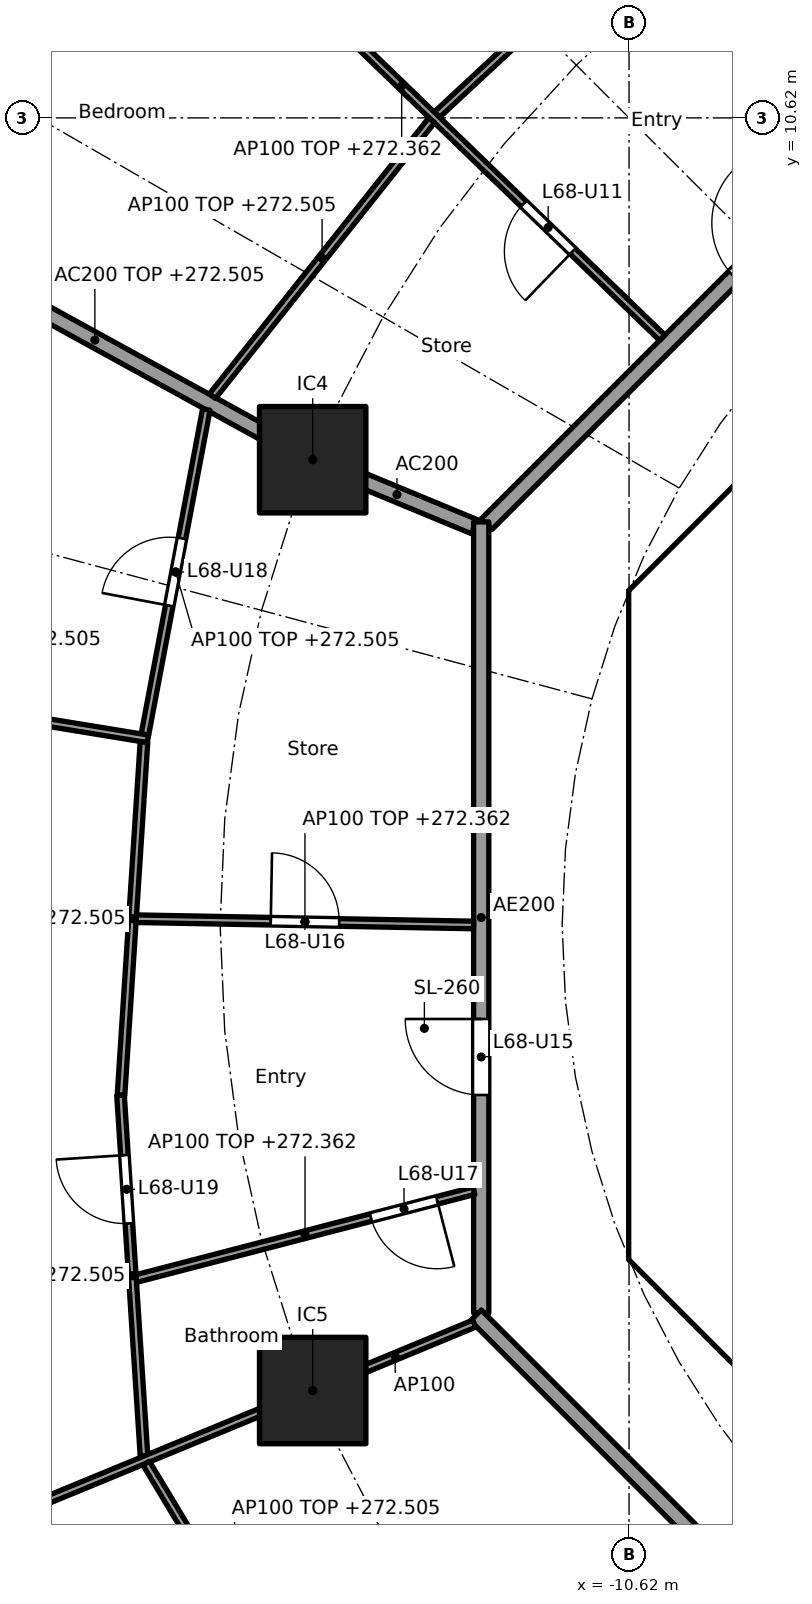
"""IFC4 building model, lengths in metres.
Left out: names, types, materials, properties, quantities, classifications, styles, units other than length and angle.
Written with IfcOpenShell. Run it as: python <this file> out.ifc"""

import sys

from ifc_helpers import new_model, si_unit, direction, frame, frame_2d, origin, origin_2d, place, context, subcontext, project, spatial, polyline, rectangle, outline, extrude, element, fill, save


model = new_model("IFC4")
c1 = context("Model", 3, precision=1e-05, world=origin(), true_north=direction((0.0, 1.0)))
c2 = subcontext(c1, "Body", "Model", "MODEL_VIEW")
j1 = project(units=[si_unit("LENGTHUNIT", "METRE"), si_unit("PLANEANGLEUNIT", "RADIAN")], contexts=[c1])
p1 = place(None, origin())
s1 = spatial("IfcSite", under=j1, at=p1, CompositionType="ELEMENT")
p2 = place(p1, origin())
s2 = spatial("IfcBuilding", under=s1, at=p2, CompositionType="ELEMENT")
p3 = place(p2, frame((0.0, 0.0, 269.6)))
s3 = spatial("IfcBuildingStorey", under=s2, at=p3, CompositionType="ELEMENT", Elevation=269.6)
for number, where, z_axis, x_axis in (
    (1, (-14.782, 6.123, 0.0), (0.0, 0.0, 1.0), (1.0, 0.0, 0.0)),
    (2, (-14.782, -6.123, 0.0), (0.0, 0.0, 1.0), (1.0, 0.0, 0.0)),
):
    element("IfcColumn", number, at=place(p3, frame(where, z_axis=z_axis, x_axis=x_axis)), inside=s3, PredefinedType="COLUMN", context=c2, shape_type="SweptSolid", body=[
        extrude(rectangle(XDim=1.4, YDim=1.4, at=origin_2d()), origin(), (0.0, 0.0, 1.0), 3.7),
    ])
p4 = place(p3, frame((-4.613, 9.988, 0.0), z_axis=(0.0, 0.0, 1.0), x_axis=(-0.707106781187, -0.707106781187, 0.0)))
e3 = element("IfcWall", 3, at=p4, inside=s3, PredefinedType="SHEAR", context=c2, shape_type="SweptSolid", body=[
    extrude(rectangle(XDim=7.602, YDim=0.6, at=frame_2d((3.801, 0.0))), origin(), (0.0, 0.0, 1.0), 3.44),
])
p5 = place(p4, frame((0.351, 0.0, 0.0)))
e4 = element("IfcOpeningElement", 4, at=p5, cuts=e3, PredefinedType="OPENING", context=c2, shape_type="SweptSolid", body=[
    extrude(rectangle(XDim=1.1, YDim=2.1, at=frame_2d((0.55, 1.05))), frame((0.0, 0.31, 0.0), z_axis=(0.0, -1.0, 0.0), x_axis=(1.0, 0.0, 0.0)), (0.0, 0.0, 1.0), 0.62),
])
p6 = place(p3, frame((-10.325, 3.801, 0.0), z_axis=(0.0, 0.0, 1.0), x_axis=(0.0, -1.0, 0.0)))
e5 = element("IfcWall", 5, at=p6, inside=s3, PredefinedType="SHEAR", context=c2, shape_type="SweptSolid", body=[
    extrude(rectangle(XDim=7.602, YDim=0.6, at=frame_2d((3.801, 0.0))), origin(), (0.0, 0.0, 1.0), 3.44),
])
p7 = place(p6, frame((0.651, 0.0, 0.0)))
e6 = element("IfcOpeningElement", 6, at=p7, cuts=e5, PredefinedType="OPENING", context=c2, shape_type="SweptSolid", body=[
    extrude(rectangle(XDim=1.5, YDim=2.1, at=frame_2d((0.75, 1.05))), frame((0.0, 0.31, 0.0), z_axis=(0.0, -1.0, 0.0), x_axis=(1.0, 0.0, 0.0)), (0.0, 0.0, 1.0), 0.62),
])
p8 = place(p6, frame((5.451, 0.0, 0.0)))
e7 = element("IfcOpeningElement", 7, at=p8, cuts=e5, PredefinedType="OPENING", context=c2, shape_type="SweptSolid", body=[
    extrude(rectangle(XDim=1.5, YDim=2.1, at=frame_2d((0.75, 1.05))), frame((0.0, 0.31, 0.0), z_axis=(0.0, -1.0, 0.0), x_axis=(1.0, 0.0, 0.0)), (0.0, 0.0, 1.0), 0.62),
])
p9 = place(p3, frame((-9.988, -4.613, 0.0), z_axis=(0.0, 0.0, 1.0), x_axis=(0.707106781187, -0.707106781187, 0.0)))
e8 = element("IfcWall", 8, at=p9, inside=s3, PredefinedType="SHEAR", context=c2, shape_type="SweptSolid", body=[
    extrude(rectangle(XDim=7.602, YDim=0.6, at=frame_2d((3.801, 0.0))), origin(), (0.0, 0.0, 1.0), 3.44),
])
p10 = place(p9, frame((6.151, 0.0, 0.0)))
e9 = element("IfcOpeningElement", 9, at=p10, cuts=e8, PredefinedType="OPENING", context=c2, shape_type="SweptSolid", body=[
    extrude(rectangle(XDim=1.1, YDim=2.1, at=frame_2d((0.55, 1.05))), frame((0.0, 0.31, 0.0), z_axis=(0.0, -1.0, 0.0), x_axis=(1.0, 0.0, 0.0)), (0.0, 0.0, 1.0), 0.62),
])
p11 = place(p3, origin())
e10 = element("IfcWall", 10, at=p11, inside=s3, PredefinedType="SHEAR", context=c2, shape_type="SweptSolid", body=[
    extrude(outline(polyline([(-10.625, -3.801), (-10.025, -3.801), (-10.025, -4.152), (-9.776, -4.401), (-10.2, -4.825), (-10.625, -4.401), (-10.625, -3.801)])), origin(), (0.0, 0.0, 1.0), 3.44),
])
p12 = place(p3, origin())
e11 = element("IfcWall", 11, at=p12, inside=s3, PredefinedType="SHEAR", context=c2, shape_type="SweptSolid", body=[
    extrude(outline(polyline([(-10.2, 4.825), (-9.776, 4.401), (-10.025, 4.152), (-10.025, 3.801), (-10.625, 3.801), (-10.625, 4.401), (-10.2, 4.825)])), origin(), (0.0, 0.0, 1.0), 3.44),
])
for number, where, z_axis, x_axis in (
    (12, (-10.025, -4.0, 0.0), (0.0, 0.0, 1.0), (1.0, 0.0, 0.0)),
    (13, (-10.025, 4.0, 0.0), (0.0, 0.0, 1.0), (1.0, 0.0, 0.0)),
):
    element("IfcWall", number, at=place(p3, frame(where, z_axis=z_axis, x_axis=x_axis)), inside=s3, PredefinedType="PARTITIONING", context=c2, shape_type="SweptSolid", body=[
        extrude(rectangle(XDim=3.325, YDim=0.2, at=frame_2d((1.662, 0.0))), origin(), (0.0, 0.0, 1.0), 3.44),
    ])
p13 = place(p3, frame((-12.657, 5.243, 0.0), z_axis=(0.0, 0.0, 1.0), x_axis=(-0.923869415315, 0.382707856524, 0.0)))
e14 = element("IfcWall", 14, at=p13, inside=s3, PredefinedType="PARTITIONING", context=c2, shape_type="SweptSolid", body=[
    extrude(rectangle(XDim=2.2, YDim=0.2, at=frame_2d((1.1, 0.0))), origin(), (0.0, 0.0, 1.0), 3.44),
])
p14 = place(p3, frame((-14.826, 6.147, 0.0), z_axis=(0.0, 0.0, 1.0), x_axis=(-0.876484755865, 0.481429613481, 0.0)))
e15 = element("IfcWall", 15, at=p14, inside=s3, PredefinedType="PARTITIONING", context=c2, shape_type="SweptSolid", body=[
    extrude(rectangle(XDim=6.439, YDim=0.2, at=frame_2d((3.219, 0.0))), origin(), (0.0, 0.0, 1.0), 2.905),
])
p15 = place(p3, frame((-5.275, 12.494, 0.0), z_axis=(0.0, 0.0, 1.0), x_axis=(-0.707106781187, -0.707106781187, 0.0)))
e16 = element("IfcWall", 16, at=p15, inside=s3, PredefinedType="PARTITIONING", context=c2, shape_type="SweptSolid", body=[
    extrude(rectangle(XDim=10.209, YDim=0.2, at=frame_2d((5.104, 0.0))), origin(), (0.0, 0.0, 1.0), 3.44),
])
p16 = place(p15, frame((4.604, 0.0, 0.0)))
e17 = element("IfcOpeningElement", 17, at=p16, cuts=e16, PredefinedType="OPENING", context=c2, shape_type="SweptSolid", body=[
    extrude(rectangle(XDim=1.0, YDim=2.1, at=frame_2d((0.5, 1.05))), frame((0.0, 0.11, 0.0), z_axis=(0.0, -1.0, 0.0), x_axis=(1.0, 0.0, 0.0)), (0.0, 0.0, 1.0), 0.22),
])
p17 = place(p3, frame((-12.565, 5.304, 0.0), z_axis=(0.0, 0.0, 1.0), x_axis=(0.0, -1.0, 0.0)))
e18 = element("IfcWall", 18, at=p17, inside=s3, PredefinedType="PARTITIONING", context=c2, shape_type="SweptSolid", body=[
    extrude(rectangle(XDim=10.409, YDim=0.2, at=frame_2d((5.205, 0.0))), origin(), (0.0, 0.0, 1.0), 3.44),
])
p18 = place(p17, frame((6.539, 0.0, 0.0)))
e19 = element("IfcOpeningElement", 19, at=p18, cuts=e18, PredefinedType="OPENING", context=c2, shape_type="SweptSolid", body=[
    extrude(rectangle(XDim=1.0, YDim=2.1, at=frame_2d((0.5, 1.05))), frame((0.0, 0.11, 0.0), z_axis=(0.0, -1.0, 0.0), x_axis=(1.0, 0.0, 0.0)), (0.0, 0.0, 1.0), 0.22),
])
p19 = place(p3, frame((-12.635, -5.134, 0.0), z_axis=(0.0, 0.0, 1.0), x_axis=(0.707106781187, -0.707106781187, 0.0)))
e20 = element("IfcWall", 20, at=p19, inside=s3, PredefinedType="PARTITIONING", context=c2, shape_type="SweptSolid", body=[
    extrude(rectangle(XDim=10.609, YDim=0.2, at=frame_2d((5.305, 0.0))), origin(), (0.0, 0.0, 1.0), 3.44),
])
p20 = place(p3, frame((-7.709, 10.197, 0.0), z_axis=(0.0, 0.0, 1.0), x_axis=(-0.515516160663, 0.856879856278, 0.0)))
e21 = element("IfcWall", 21, at=p20, inside=s3, PredefinedType="PARTITIONING", context=c2, shape_type="SweptSolid", body=[
    extrude(rectangle(XDim=9.426, YDim=0.1, at=frame_2d((4.713, 0.0))), origin(), (0.0, 0.0, 1.0), 2.762),
])
p21 = place(p20, frame((1.615, 0.0, 0.0)))
e22 = element("IfcOpeningElement", 22, at=p21, cuts=e21, PredefinedType="OPENING", context=c2, shape_type="SweptSolid", body=[
    extrude(rectangle(XDim=0.9, YDim=2.1, at=frame_2d((0.45, 1.05))), frame((0.0, 0.06, 0.0), z_axis=(0.0, -1.0, 0.0), x_axis=(1.0, 0.0, 0.0)), (0.0, 0.0, 1.0), 0.12),
])
p22 = place(p20, frame((6.328, 0.0, 0.0)))
e23 = element("IfcOpeningElement", 23, at=p22, cuts=e21, PredefinedType="OPENING", context=c2, shape_type="SweptSolid", body=[
    extrude(rectangle(XDim=0.9, YDim=2.1, at=frame_2d((0.45, 1.05))), frame((0.0, 0.06, 0.0), z_axis=(0.0, -1.0, 0.0), x_axis=(1.0, 0.0, 0.0)), (0.0, 0.0, 1.0), 0.12),
])
p23 = place(p3, frame((-9.875, 13.702, 0.0), z_axis=(0.0, 0.0, 1.0), x_axis=(-0.732618266441, -0.680639754699, 0.0)))
e24 = element("IfcWall", 24, at=p23, inside=s3, PredefinedType="PARTITIONING", context=c2, shape_type="SweptSolid", body=[
    extrude(rectangle(XDim=4.467, YDim=0.1, at=frame_2d((2.233, 0.0))), origin(), (0.0, 0.0, 1.0), 2.905),
])
p24 = place(p23, frame((1.783, 0.0, 0.0)))
e25 = element("IfcOpeningElement", 25, at=p24, cuts=e24, PredefinedType="OPENING", context=c2, shape_type="SweptSolid", body=[
    extrude(rectangle(XDim=0.9, YDim=2.1, at=frame_2d((0.45, 1.05))), frame((0.0, 0.06, 0.0), z_axis=(0.0, -1.0, 0.0), x_axis=(1.0, 0.0, 0.0)), (0.0, 0.0, 1.0), 0.12),
])
p25 = place(p3, frame((-10.183, 7.727, 0.0), z_axis=(0.0, 0.0, 1.0), x_axis=(-0.719063433856, 0.694944442449, 0.0)))
e26 = element("IfcWall", 26, at=p25, inside=s3, PredefinedType="PARTITIONING", context=c2, shape_type="SweptSolid", body=[
    extrude(rectangle(XDim=9.535, YDim=0.1, at=frame_2d((4.768, 0.0))), origin(), (0.0, 0.0, 1.0), 2.762),
])
p26 = place(p25, frame((1.637, 0.0, 0.0)))
e27 = element("IfcOpeningElement", 27, at=p26, cuts=e26, PredefinedType="OPENING", context=c2, shape_type="SweptSolid", body=[
    extrude(rectangle(XDim=0.9, YDim=2.1, at=frame_2d((0.45, 1.05))), frame((0.0, 0.06, 0.0), z_axis=(0.0, -1.0, 0.0), x_axis=(1.0, 0.0, 0.0)), (0.0, 0.0, 1.0), 0.12),
])
p27 = place(p25, frame((6.405, 0.0, 0.0)))
e28 = element("IfcOpeningElement", 28, at=p27, cuts=e26, PredefinedType="OPENING", context=c2, shape_type="SweptSolid", body=[
    extrude(rectangle(XDim=0.9, YDim=2.1, at=frame_2d((0.45, 1.05))), frame((0.0, 0.06, 0.0), z_axis=(0.0, -1.0, 0.0), x_axis=(1.0, 0.0, 0.0)), (0.0, 0.0, 1.0), 0.12),
])
p28 = place(p3, frame((-13.216, 10.589, 0.0), z_axis=(0.0, 0.0, 1.0), x_axis=(-0.622251572882, -0.782817335045, 0.0)))
e29 = element("IfcWall", 29, at=p28, inside=s3, PredefinedType="PARTITIONING", context=c2, shape_type="SweptSolid", body=[
    extrude(rectangle(XDim=4.636, YDim=0.1, at=frame_2d((2.318, 0.0))), origin(), (0.0, 0.0, 1.0), 2.905),
])
p29 = place(p3, frame((-16.181, 6.783, 0.0), z_axis=(0.0, 0.0, 1.0), x_axis=(-0.185670583745, -0.982612046706, 0.0)))
e30 = element("IfcWall", 30, at=p29, inside=s3, PredefinedType="PARTITIONING", context=c2, shape_type="SweptSolid", body=[
    extrude(rectangle(XDim=4.351, YDim=0.1, at=frame_2d((2.176, 0.0))), origin(), (0.0, 0.0, 1.0), 2.905),
])
p30 = place(p29, frame((1.726, 0.0, 0.0)))
e31 = element("IfcOpeningElement", 31, at=p30, cuts=e30, PredefinedType="OPENING", context=c2, shape_type="SweptSolid", body=[
    extrude(rectangle(XDim=0.9, YDim=2.1, at=frame_2d((0.45, 1.05))), frame((0.0, 0.06, 0.0), z_axis=(0.0, -1.0, 0.0), x_axis=(1.0, 0.0, 0.0)), (0.0, 0.0, 1.0), 0.12),
])
p31 = place(p3, frame((-16.949, 2.451, 0.0), z_axis=(0.0, 0.0, 1.0), x_axis=(-0.986937570833, 0.161103169673, 0.0)))
e32 = element("IfcWall", 32, at=p31, inside=s3, PredefinedType="PARTITIONING", context=c2, shape_type="SweptSolid", body=[
    extrude(rectangle(XDim=5.743, YDim=0.1, at=frame_2d((2.872, 0.0))), origin(), (0.0, 0.0, 1.0), 2.905),
])
p32 = place(p3, frame((-17.002, 2.409, 0.0), z_axis=(0.0, 0.0, 1.0), x_axis=(-0.064855550758, -0.997894662545, 0.0)))
e33 = element("IfcWall", 33, at=p32, inside=s3, PredefinedType="PARTITIONING", context=c2, shape_type="SweptSolid", body=[
    extrude(rectangle(XDim=4.656, YDim=0.1, at=frame_2d((2.328, 0.0))), origin(), (0.0, 0.0, 1.0), 2.905),
])
p33 = place(p3, frame((-12.665, 0.002, 0.0), z_axis=(0.0, 0.0, 1.0), x_axis=(-0.999827178165, 0.018590691287, 0.0)))
e34 = element("IfcWall", 34, at=p33, inside=s3, PredefinedType="PARTITIONING", context=c2, shape_type="SweptSolid", body=[
    extrude(rectangle(XDim=4.439, YDim=0.1, at=frame_2d((2.219, 0.0))), origin(), (0.0, 0.0, 1.0), 2.762),
])
p34 = place(p33, frame((1.769, 0.0, 0.0)))
e35 = element("IfcOpeningElement", 35, at=p34, cuts=e34, PredefinedType="OPENING", context=c2, shape_type="SweptSolid", body=[
    extrude(rectangle(XDim=0.9, YDim=2.1, at=frame_2d((0.45, 1.05))), frame((0.0, 0.06, 0.0), z_axis=(0.0, -1.0, 0.0), x_axis=(1.0, 0.0, 0.0)), (0.0, 0.0, 1.0), 0.12),
])
p35 = place(p3, frame((-17.31, -2.238, 0.0), z_axis=(0.0, 0.0, 1.0), x_axis=(0.064949202176, -0.997888571503, 0.0)))
e36 = element("IfcWall", 36, at=p35, inside=s3, PredefinedType="PARTITIONING", context=c2, shape_type="SweptSolid", body=[
    extrude(rectangle(XDim=4.759, YDim=0.1, at=frame_2d((2.379, 0.0))), origin(), (0.0, 0.0, 1.0), 2.905),
])
p36 = place(p35, frame((0.79, 0.0, 0.0)))
e37 = element("IfcOpeningElement", 37, at=p36, cuts=e36, PredefinedType="OPENING", context=c2, shape_type="SweptSolid", body=[
    extrude(rectangle(XDim=0.9, YDim=2.1, at=frame_2d((0.45, 1.05))), frame((0.0, 0.06, 0.0), z_axis=(0.0, -1.0, 0.0), x_axis=(1.0, 0.0, 0.0)), (0.0, 0.0, 1.0), 0.12),
])
p37 = place(p3, frame((-12.662, -3.495, 0.0), z_axis=(0.0, 0.0, 1.0), x_axis=(-0.967834941053, -0.251586022817, 0.0)))
e38 = element("IfcWall", 38, at=p37, inside=s3, PredefinedType="PARTITIONING", context=c2, shape_type="SweptSolid", body=[
    extrude(rectangle(XDim=4.59, YDim=0.1, at=frame_2d((2.295, 0.0))), origin(), (0.0, 0.0, 1.0), 2.762),
])
p38 = place(p37, frame((0.5, 0.0, 0.0)))
e39 = element("IfcOpeningElement", 39, at=p38, cuts=e38, PredefinedType="OPENING", context=c2, shape_type="SweptSolid", body=[
    extrude(rectangle(XDim=0.9, YDim=2.1, at=frame_2d((0.45, 1.05))), frame((0.0, 0.06, 0.0), z_axis=(0.0, -1.0, 0.0), x_axis=(1.0, 0.0, 0.0)), (0.0, 0.0, 1.0), 0.12),
])
p39 = place(p3, frame((-12.657, -5.243, 0.0), z_axis=(0.0, 0.0, 1.0), x_axis=(-0.923871314276, -0.382703272338, 0.0)))
e40 = element("IfcWall", 40, at=p39, inside=s3, PredefinedType="PARTITIONING", context=c2, shape_type="SweptSolid", body=[
    extrude(rectangle(XDim=2.249, YDim=0.1, at=frame_2d((1.125, 0.0))), origin(), (0.0, 0.0, 1.0), 3.44),
])
p40 = place(p3, frame((-14.828, -6.142, 0.0), z_axis=(0.0, 0.0, 1.0), x_axis=(-0.924478087429, -0.381235184451, 0.0)))
e41 = element("IfcWall", 41, at=p40, inside=s3, PredefinedType="PARTITIONING", context=c2, shape_type="SweptSolid", body=[
    extrude(rectangle(XDim=8.499, YDim=0.1, at=frame_2d((4.25, 0.0))), origin(), (0.0, 0.0, 1.0), 2.905),
])
p41 = place(p40, frame((4.973, 0.0, 0.0)))
e42 = element("IfcOpeningElement", 42, at=p41, cuts=e41, PredefinedType="OPENING", context=c2, shape_type="SweptSolid", body=[
    extrude(rectangle(XDim=0.9, YDim=2.1, at=frame_2d((0.45, 1.05))), frame((0.0, 0.06, 0.0), z_axis=(0.0, -1.0, 0.0), x_axis=(1.0, 0.0, 0.0)), (0.0, 0.0, 1.0), 0.12),
])
p42 = place(p3, frame((-16.972, -7.08, 0.0), z_axis=(0.0, 0.0, 1.0), x_axis=(0.514989049311, -0.857196756346, 0.0)))
e43 = element("IfcWall", 43, at=p42, inside=s3, PredefinedType="PARTITIONING", context=c2, shape_type="SweptSolid", body=[
    extrude(rectangle(XDim=4.512, YDim=0.1, at=frame_2d((2.256, 0.0))), origin(), (0.0, 0.0, 1.0), 2.905),
])
p43 = place(p42, frame((1.806, 0.0, 0.0)))
e44 = element("IfcOpeningElement", 44, at=p43, cuts=e43, PredefinedType="OPENING", context=c2, shape_type="SweptSolid", body=[
    extrude(rectangle(XDim=0.9, YDim=2.1, at=frame_2d((0.45, 1.05))), frame((0.0, 0.06, 0.0), z_axis=(0.0, -1.0, 0.0), x_axis=(1.0, 0.0, 0.0)), (0.0, 0.0, 1.0), 0.12),
])
p44 = place(p7, origin())
e45 = element("IfcDoor", 45, at=p44, inside=s3, OperationType="DOUBLE_DOOR_SINGLE_SWING", PredefinedType="DOOR", context=c2, shape_type="SweptSolid", body=[
    extrude(rectangle(XDim=1.5, YDim=2.1, at=frame_2d((0.75, 1.05))), frame((0.0, 0.025, 0.0), z_axis=(0.0, -1.0, 0.0), x_axis=(1.0, 0.0, 0.0)), (0.0, 0.0, 1.0), 0.05),
])
fill(e6, e45)
p45 = place(p8, origin())
e46 = element("IfcDoor", 46, at=p45, inside=s3, OperationType="DOUBLE_DOOR_SINGLE_SWING", PredefinedType="DOOR", context=c2, shape_type="SweptSolid", body=[
    extrude(rectangle(XDim=1.5, YDim=2.1, at=frame_2d((0.75, 1.05))), frame((0.0, 0.025, 0.0), z_axis=(0.0, -1.0, 0.0), x_axis=(1.0, 0.0, 0.0)), (0.0, 0.0, 1.0), 0.05),
])
fill(e7, e46)
p46 = place(p16, frame((1.0, 0.0, 0.0), x_axis=(-1.0, 0.0, 0.0)))
e47 = element("IfcDoor", 47, at=p46, inside=s3, OperationType="SINGLE_SWING_RIGHT", PredefinedType="DOOR", context=c2, shape_type="SweptSolid", body=[
    extrude(rectangle(XDim=1.0, YDim=2.1, at=frame_2d((0.5, 1.05))), frame((0.0, 0.025, 0.0), z_axis=(0.0, -1.0, 0.0), x_axis=(1.0, 0.0, 0.0)), (0.0, 0.0, 1.0), 0.05),
])
fill(e17, e47)
p47 = place(p26, origin())
e48 = element("IfcDoor", 48, at=p47, inside=s3, OperationType="SINGLE_SWING_LEFT", PredefinedType="DOOR", context=c2, shape_type="SweptSolid", body=[
    extrude(rectangle(XDim=0.9, YDim=2.1, at=frame_2d((0.45, 1.05))), frame((0.0, 0.025, 0.0), z_axis=(0.0, -1.0, 0.0), x_axis=(1.0, 0.0, 0.0)), (0.0, 0.0, 1.0), 0.05),
])
fill(e27, e48)
p48 = place(p18, frame((1.0, 0.0, 0.0), x_axis=(-1.0, 0.0, 0.0)))
e49 = element("IfcDoor", 49, at=p48, inside=s3, OperationType="SINGLE_SWING_RIGHT", PredefinedType="DOOR", context=c2, shape_type="SweptSolid", body=[
    extrude(rectangle(XDim=1.0, YDim=2.1, at=frame_2d((0.5, 1.05))), frame((0.0, 0.025, 0.0), z_axis=(0.0, -1.0, 0.0), x_axis=(1.0, 0.0, 0.0)), (0.0, 0.0, 1.0), 0.05),
])
fill(e19, e49)
p49 = place(p34, frame((0.9, 0.0, 0.0), x_axis=(-1.0, 0.0, 0.0)))
e50 = element("IfcDoor", 50, at=p49, inside=s3, OperationType="SINGLE_SWING_LEFT", PredefinedType="DOOR", context=c2, shape_type="SweptSolid", body=[
    extrude(rectangle(XDim=0.9, YDim=2.1, at=frame_2d((0.45, 1.05))), frame((0.0, 0.025, 0.0), z_axis=(0.0, -1.0, 0.0), x_axis=(1.0, 0.0, 0.0)), (0.0, 0.0, 1.0), 0.05),
])
fill(e35, e50)
p50 = place(p38, origin())
e51 = element("IfcDoor", 51, at=p50, inside=s3, OperationType="SINGLE_SWING_LEFT", PredefinedType="DOOR", context=c2, shape_type="SweptSolid", body=[
    extrude(rectangle(XDim=0.9, YDim=2.1, at=frame_2d((0.45, 1.05))), frame((0.0, 0.025, 0.0), z_axis=(0.0, -1.0, 0.0), x_axis=(1.0, 0.0, 0.0)), (0.0, 0.0, 1.0), 0.05),
])
fill(e39, e51)
p51 = place(p30, frame((0.9, 0.0, 0.0), x_axis=(-1.0, 0.0, 0.0)))
e52 = element("IfcDoor", 52, at=p51, inside=s3, OperationType="SINGLE_SWING_LEFT", PredefinedType="DOOR", context=c2, shape_type="SweptSolid", body=[
    extrude(rectangle(XDim=0.9, YDim=2.1, at=frame_2d((0.45, 1.05))), frame((0.0, 0.025, 0.0), z_axis=(0.0, -1.0, 0.0), x_axis=(1.0, 0.0, 0.0)), (0.0, 0.0, 1.0), 0.05),
])
fill(e31, e52)
p52 = place(p36, frame((0.9, 0.0, 0.0), x_axis=(-1.0, 0.0, 0.0)))
e53 = element("IfcDoor", 53, at=p52, inside=s3, OperationType="SINGLE_SWING_RIGHT", PredefinedType="DOOR", context=c2, shape_type="SweptSolid", body=[
    extrude(rectangle(XDim=0.9, YDim=2.1, at=frame_2d((0.45, 1.05))), frame((0.0, 0.025, 0.0), z_axis=(0.0, -1.0, 0.0), x_axis=(1.0, 0.0, 0.0)), (0.0, 0.0, 1.0), 0.05),
])
fill(e37, e53)
save(model, sys.argv[1])
